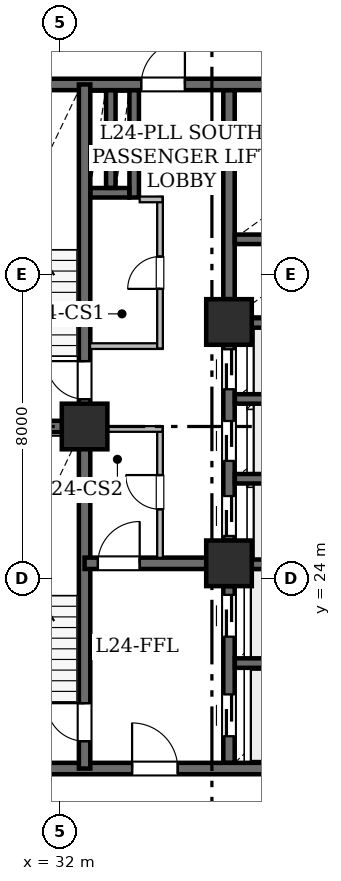
"""IFC4 building model, lengths in metres.
Left out: names, types, materials, properties, quantities, classifications, styles, units other than length and angle.
Written with IfcOpenShell. Run it as: python <this file> out.ifc"""

import sys

from ifc_helpers import new_model, si_unit, direction, frame, frame_2d, origin, origin_2d, place, context, subcontext, project, spatial, rectangle, hollow_rectangle, extrude, element, fill, save


model = new_model("IFC4")
c1 = context("Model", 3, precision=1e-05, world=origin(), true_north=direction((0.0, 1.0)))
c2 = subcontext(c1, "Body", "Model", "MODEL_VIEW")
j1 = project(units=[si_unit("LENGTHUNIT", "METRE"), si_unit("PLANEANGLEUNIT", "RADIAN")], contexts=[c1])
p1 = place(None, origin())
s1 = spatial("IfcSite", under=j1, at=p1, CompositionType="ELEMENT")
p2 = place(p1, origin())
s2 = spatial("IfcBuilding", under=s1, at=p2, CompositionType="ELEMENT")
p3 = place(p2, frame((0.0, 0.0, 98.25)))
s3 = spatial("IfcBuildingStorey", under=s2, at=p3, CompositionType="ELEMENT", Elevation=98.25)
for number, where, z_axis, x_axis in (
    (1, (32.65, 28.0, 0.0), (0.0, 0.0, 1.0), (1.0, 0.0, 0.0)),
    (2, (36.45, 24.4, 0.0), (0.0, 0.0, 1.0), (1.0, 0.0, 0.0)),
    (3, (36.45, 30.75, 0.0), (0.0, 0.0, 1.0), (1.0, 0.0, 0.0)),
):
    element("IfcColumn", number, at=place(p3, frame(where, z_axis=z_axis, x_axis=x_axis)), inside=s3, PredefinedType="COLUMN", context=c2, shape_type="SweptSolid", body=[
        extrude(hollow_rectangle(XDim=1.2, YDim=1.2, WallThickness=0.06, at=origin_2d()), origin(), (0.0, 0.0, 1.0), 3.65),
    ])
p4 = place(p3, frame((29.0, 19.0, 0.0), z_axis=(0.0, 0.0, 1.0), x_axis=(1.0, 0.0, 0.0)))
e4 = element("IfcWall", 4, at=p4, inside=s3, PredefinedType="SHEAR", context=c2, shape_type="SweptSolid", body=[
    extrude(rectangle(XDim=10.4, YDim=0.3, at=frame_2d((5.2, 0.0))), origin(), (0.0, 0.0, 1.0), 3.43),
])
p5 = place(p4, frame((4.9, 0.0, 0.0)))
e5 = element("IfcOpeningElement", 5, at=p5, cuts=e4, PredefinedType="OPENING", context=c2, shape_type="SweptSolid", body=[
    extrude(rectangle(XDim=1.2, YDim=2.15, at=frame_2d((0.6, 1.075))), frame((0.0, 0.16, 0.0), z_axis=(0.0, -1.0, 0.0), x_axis=(1.0, 0.0, 0.0)), (0.0, 0.0, 1.0), 0.32),
])
p6 = place(p3, frame((29.0, 37.0, 0.0), z_axis=(0.0, 0.0, 1.0), x_axis=(1.0, 0.0, 0.0)))
e6 = element("IfcWall", 6, at=p6, inside=s3, PredefinedType="SHEAR", context=c2, shape_type="SweptSolid", body=[
    extrude(rectangle(XDim=10.4, YDim=0.3, at=frame_2d((5.2, 0.0))), origin(), (0.0, 0.0, 1.0), 3.43),
])
p7 = place(p6, frame((5.14, 0.0, 0.0)))
e7 = element("IfcOpeningElement", 7, at=p7, cuts=e6, PredefinedType="OPENING", context=c2, shape_type="SweptSolid", body=[
    extrude(rectangle(XDim=1.15, YDim=2.2, at=frame_2d((0.575, 1.1))), frame((0.0, 0.16, 0.0), z_axis=(0.0, -1.0, 0.0), x_axis=(1.0, 0.0, 0.0)), (0.0, 0.0, 1.0), 0.32),
])
p8 = place(p3, frame((32.65, 19.0, 0.0), z_axis=(0.0, 0.0, 1.0), x_axis=(0.0, 1.0, 0.0)))
e8 = element("IfcWall", 8, at=p8, inside=s3, PredefinedType="SHEAR", context=c2, shape_type="SweptSolid", body=[
    extrude(rectangle(XDim=9.0, YDim=0.3, at=frame_2d((4.5, 0.0))), origin(), (0.0, 0.0, 1.0), 3.43),
])
p9 = place(p8, frame((0.72, 0.0, 0.0)))
e9 = element("IfcOpeningElement", 9, at=p9, cuts=e8, PredefinedType="OPENING", context=c2, shape_type="SweptSolid", body=[
    extrude(rectangle(XDim=1.0, YDim=2.15, at=frame_2d((0.5, 1.075))), frame((0.0, 0.16, 0.0), z_axis=(0.0, -1.0, 0.0), x_axis=(1.0, 0.0, 0.0)), (0.0, 0.0, 1.0), 0.32),
])
p10 = place(p3, frame((32.65, 28.0, 0.0), z_axis=(0.0, 0.0, 1.0), x_axis=(0.0, 1.0, 0.0)))
e10 = element("IfcWall", 10, at=p10, inside=s3, PredefinedType="SHEAR", context=c2, shape_type="SweptSolid", body=[
    extrude(rectangle(XDim=9.0, YDim=0.3, at=frame_2d((4.5, 0.0))), origin(), (0.0, 0.0, 1.0), 3.43),
])
p11 = place(p10, frame((0.72, 0.0, 0.0)))
e11 = element("IfcOpeningElement", 11, at=p11, cuts=e10, PredefinedType="OPENING", context=c2, shape_type="SweptSolid", body=[
    extrude(rectangle(XDim=1.0, YDim=2.15, at=frame_2d((0.5, 1.075))), frame((0.0, 0.16, 0.0), z_axis=(0.0, -1.0, 0.0), x_axis=(1.0, 0.0, 0.0)), (0.0, 0.0, 1.0), 0.32),
])
p12 = place(p3, frame((29.0, 28.0, 0.0), z_axis=(0.0, 0.0, 1.0), x_axis=(1.0, 0.0, 0.0)))
e12 = element("IfcWall", 12, at=p12, inside=s3, PredefinedType="SHEAR", context=c2, shape_type="SweptSolid", body=[
    extrude(rectangle(XDim=3.65, YDim=0.3, at=frame_2d((1.825, 0.0))), origin(), (0.0, 0.0, 1.0), 3.43),
])
p13 = place(p3, frame((32.65, 24.4, 0.0), z_axis=(0.0, 0.0, 1.0), x_axis=(1.0, 0.0, 0.0)))
e13 = element("IfcWall", 13, at=p13, inside=s3, PredefinedType="SHEAR", context=c2, shape_type="SweptSolid", body=[
    extrude(rectangle(XDim=3.8, YDim=0.3, at=frame_2d((1.9, 0.0))), origin(), (0.0, 0.0, 1.0), 3.43),
])
p14 = place(p13, frame((0.35, 0.0, 0.0)))
e14 = element("IfcOpeningElement", 14, at=p14, cuts=e13, PredefinedType="OPENING", context=c2, shape_type="SweptSolid", body=[
    extrude(rectangle(XDim=1.1, YDim=2.15, at=frame_2d((0.55, 1.075))), frame((0.0, 0.16, 0.0), z_axis=(0.0, -1.0, 0.0), x_axis=(1.0, 0.0, 0.0)), (0.0, 0.0, 1.0), 0.32),
])
p15 = place(p3, frame((36.45, 19.154, 0.0), z_axis=(0.0, 0.0, 1.0), x_axis=(0.0, 1.0, 0.0)))
e15 = element("IfcWall", 15, at=p15, inside=s3, PredefinedType="SHEAR", context=c2, shape_type="SweptSolid", body=[
    extrude(rectangle(XDim=4.646, YDim=0.3, at=frame_2d((2.323, 0.0))), origin(), (0.0, 0.0, 1.0), 3.43),
])
p16 = place(p15, frame((0.696, 0.0, 0.0)))
e16 = element("IfcOpeningElement", 16, at=p16, cuts=e15, PredefinedType="OPENING", context=c2, shape_type="SweptSolid", body=[
    extrude(rectangle(XDim=1.1, YDim=2.15, at=frame_2d((0.55, 1.075))), frame((0.0, 0.16, 0.0), z_axis=(0.0, -1.0, 0.0), x_axis=(1.0, 0.0, 0.0)), (0.0, 0.0, 1.0), 0.32),
])
p17 = place(p15, frame((3.316, 0.0, 0.0)))
e17 = element("IfcOpeningElement", 17, at=p17, cuts=e15, PredefinedType="OPENING", context=c2, shape_type="SweptSolid", body=[
    extrude(rectangle(XDim=1.1, YDim=2.15, at=frame_2d((0.55, 1.075))), frame((0.0, 0.16, 0.0), z_axis=(0.0, -1.0, 0.0), x_axis=(1.0, 0.0, 0.0)), (0.0, 0.0, 1.0), 0.32),
])
p18 = place(p3, frame((36.45, 25.0, 0.0), z_axis=(0.0, 0.0, 1.0), x_axis=(0.0, 1.0, 0.0)))
e18 = element("IfcWall", 18, at=p18, inside=s3, PredefinedType="SHEAR", context=c2, shape_type="SweptSolid", body=[
    extrude(rectangle(XDim=5.15, YDim=0.3, at=frame_2d((2.575, 0.0))), origin(), (0.0, 0.0, 1.0), 3.43),
])
p19 = place(p18, frame((0.12, 0.0, 0.0)))
e19 = element("IfcOpeningElement", 19, at=p19, cuts=e18, PredefinedType="OPENING", context=c2, shape_type="SweptSolid", body=[
    extrude(rectangle(XDim=1.05, YDim=2.15, at=frame_2d((0.525, 1.075))), frame((0.0, 0.16, 0.0), z_axis=(0.0, -1.0, 0.0), x_axis=(1.0, 0.0, 0.0)), (0.0, 0.0, 1.0), 0.32),
])
p20 = place(p18, frame((2.095, 0.0, 0.0)))
e20 = element("IfcOpeningElement", 20, at=p20, cuts=e18, PredefinedType="OPENING", context=c2, shape_type="SweptSolid", body=[
    extrude(rectangle(XDim=1.05, YDim=2.15, at=frame_2d((0.525, 1.075))), frame((0.0, 0.16, 0.0), z_axis=(0.0, -1.0, 0.0), x_axis=(1.0, 0.0, 0.0)), (0.0, 0.0, 1.0), 0.32),
])
p21 = place(p18, frame((3.98, 0.0, 0.0)))
e21 = element("IfcOpeningElement", 21, at=p21, cuts=e18, PredefinedType="OPENING", context=c2, shape_type="SweptSolid", body=[
    extrude(rectangle(XDim=1.05, YDim=2.15, at=frame_2d((0.525, 1.075))), frame((0.0, 0.16, 0.0), z_axis=(0.0, -1.0, 0.0), x_axis=(1.0, 0.0, 0.0)), (0.0, 0.0, 1.0), 0.32),
])
p22 = place(p3, frame((36.45, 31.35, 0.0), z_axis=(0.0, 0.0, 1.0), x_axis=(0.0, 1.0, 0.0)))
e22 = element("IfcWall", 22, at=p22, inside=s3, PredefinedType="SHEAR", context=c2, shape_type="SweptSolid", body=[
    extrude(rectangle(XDim=5.496, YDim=0.3, at=frame_2d((2.748, 0.0))), origin(), (0.0, 0.0, 1.0), 3.43),
])
for number, where, z_axis, x_axis in (
    (23, (36.604, 21.775, 0.0), (0.0, 0.0, 1.0), (1.0, 0.0, 0.0)),
    (24, (36.604, 24.375, 0.0), (0.0, 0.0, 1.0), (1.0, 0.0, 0.0)),
    (25, (36.604, 26.625, 0.0), (0.0, 0.0, 1.0), (1.0, 0.0, 0.0)),
    (26, (36.604, 28.725, 0.0), (0.0, 0.0, 1.0), (1.0, 0.0, 0.0)),
    (27, (36.604, 30.725, 0.0), (0.0, 0.0, 1.0), (1.0, 0.0, 0.0)),
    (28, (36.604, 32.925, 0.0), (0.0, 0.0, 1.0), (1.0, 0.0, 0.0)),
    (29, (36.604, 34.975, 0.0), (0.0, 0.0, 1.0), (1.0, 0.0, 0.0)),
):
    element("IfcWall", number, at=place(p3, frame(where, z_axis=z_axis, x_axis=x_axis)), inside=s3, PredefinedType="SHEAR", context=c2, shape_type="SweptSolid", body=[
        extrude(rectangle(XDim=2.642, YDim=0.25, at=frame_2d((1.321, 0.0))), origin(), (0.0, 0.0, 1.0), 3.43),
    ])
p23 = place(p3, frame((33.955, 34.025, 0.0), z_axis=(0.0, 0.0, 1.0), x_axis=(0.0, 1.0, 0.0)))
e30 = element("IfcWall", 30, at=p23, inside=s3, PredefinedType="SHEAR", context=c2, shape_type="SweptSolid", body=[
    extrude(rectangle(XDim=2.821, YDim=0.25, at=frame_2d((1.411, 0.0))), origin(), (0.0, 0.0, 1.0), 3.43),
])
p24 = place(p3, frame((32.804, 34.15, 0.0), z_axis=(0.0, 0.0, 1.0), x_axis=(1.0, 0.0, 0.0)))
e31 = element("IfcWall", 31, at=p24, inside=s3, PredefinedType="SHEAR", context=c2, shape_type="SweptSolid", body=[
    extrude(rectangle(XDim=1.022, YDim=0.25, at=frame_2d((0.511, 0.0))), origin(), (0.0, 0.0, 1.0), 3.43),
])
p25 = place(p3, frame((33.34, 34.279, 0.0), z_axis=(0.0, 0.0, 1.0), x_axis=(0.0, 1.0, 0.0)))
e32 = element("IfcWall", 32, at=p25, inside=s3, PredefinedType="SHEAR", context=c2, shape_type="SweptSolid", body=[
    extrude(rectangle(XDim=2.567, YDim=0.25, at=frame_2d((1.283, 0.0))), origin(), (0.0, 0.0, 1.0), 3.43),
])
p26 = place(p3, frame((32.794, 30.115, 0.0), z_axis=(0.0, 0.0, 1.0), x_axis=(1.0, 0.0, 0.0)))
e33 = element("IfcWall", 33, at=p26, inside=s3, PredefinedType="STANDARD", context=c2, shape_type="SweptSolid", body=[
    extrude(rectangle(XDim=1.906, YDim=0.15, at=frame_2d((0.953, 0.0))), origin(), (0.0, 0.0, 1.0), 2.887),
])
p27 = place(p3, frame((34.635, 30.052, 0.0), z_axis=(0.0, 0.0, 1.0), x_axis=(0.0, 1.0, 0.0)))
e34 = element("IfcWall", 34, at=p27, inside=s3, PredefinedType="STANDARD", context=c2, shape_type="SweptSolid", body=[
    extrude(rectangle(XDim=3.988, YDim=0.15, at=frame_2d((1.994, 0.0))), origin(), (0.0, 0.0, 1.0), 3.43),
])
p28 = place(p27, frame((1.569, 0.0, 0.0)))
e35 = element("IfcOpeningElement", 35, at=p28, cuts=e34, PredefinedType="OPENING", context=c2, shape_type="SweptSolid", body=[
    extrude(rectangle(XDim=0.85, YDim=2.1, at=frame_2d((0.425, 1.05))), frame((0.0, 0.085, 0.0), z_axis=(0.0, -1.0, 0.0), x_axis=(1.0, 0.0, 0.0)), (0.0, 0.0, 1.0), 0.17),
])
p29 = place(p3, frame((34.7, 33.975, 0.0), z_axis=(0.0, 0.0, 1.0), x_axis=(-1.0, 0.0, 0.0)))
e36 = element("IfcWall", 36, at=p29, inside=s3, PredefinedType="STANDARD", context=c2, shape_type="SweptSolid", body=[
    extrude(rectangle(XDim=0.6, YDim=0.15, at=frame_2d((0.3, 0.0))), origin(), (0.0, 0.0, 1.0), 3.43),
])
p30 = place(p3, frame((34.635, 24.544, 0.0), z_axis=(0.0, 0.0, 1.0), x_axis=(0.0, 1.0, 0.0)))
e37 = element("IfcWall", 37, at=p30, inside=s3, PredefinedType="STANDARD", context=c2, shape_type="SweptSolid", body=[
    extrude(rectangle(XDim=3.456, YDim=0.15, at=frame_2d((1.728, 0.0))), origin(), (0.0, 0.0, 1.0), 3.43),
])
p31 = place(p30, frame((1.278, 0.0, 0.0)))
e38 = element("IfcOpeningElement", 38, at=p31, cuts=e37, PredefinedType="OPENING", context=c2, shape_type="SweptSolid", body=[
    extrude(rectangle(XDim=0.9, YDim=2.1, at=frame_2d((0.45, 1.05))), frame((0.0, 0.085, 0.0), z_axis=(0.0, -1.0, 0.0), x_axis=(1.0, 0.0, 0.0)), (0.0, 0.0, 1.0), 0.17),
])
p32 = place(p3, frame((34.7, 27.935, 0.0), z_axis=(0.0, 0.0, 1.0), x_axis=(-1.0, 0.0, 0.0)))
e39 = element("IfcWall", 39, at=p32, inside=s3, PredefinedType="STANDARD", context=c2, shape_type="SweptSolid", body=[
    extrude(rectangle(XDim=1.906, YDim=0.15, at=frame_2d((0.953, 0.0))), origin(), (0.0, 0.0, 1.0), 2.887),
])
p33 = place(p9, origin())
e40 = element("IfcDoor", 40, at=p33, inside=s3, OperationType="SINGLE_SWING_RIGHT", PredefinedType="DOOR", context=c2, shape_type="SweptSolid", body=[
    extrude(rectangle(XDim=1.0, YDim=2.15, at=frame_2d((0.5, 1.075))), frame((0.0, 0.025, 0.0), z_axis=(0.0, -1.0, 0.0), x_axis=(1.0, 0.0, 0.0)), (0.0, 0.0, 1.0), 0.05),
])
fill(e9, e40)
p34 = place(p11, origin())
e41 = element("IfcDoor", 41, at=p34, inside=s3, OperationType="SINGLE_SWING_RIGHT", PredefinedType="DOOR", context=c2, shape_type="SweptSolid", body=[
    extrude(rectangle(XDim=1.0, YDim=2.15, at=frame_2d((0.5, 1.075))), frame((0.0, 0.025, 0.0), z_axis=(0.0, -1.0, 0.0), x_axis=(1.0, 0.0, 0.0)), (0.0, 0.0, 1.0), 0.05),
])
fill(e11, e41)
p35 = place(p14, origin())
e42 = element("IfcDoor", 42, at=p35, inside=s3, OperationType="SINGLE_SWING_RIGHT", PredefinedType="DOOR", context=c2, shape_type="SweptSolid", body=[
    extrude(rectangle(XDim=1.1, YDim=2.15, at=frame_2d((0.55, 1.075))), frame((0.0, 0.025, 0.0), z_axis=(0.0, -1.0, 0.0), x_axis=(1.0, 0.0, 0.0)), (0.0, 0.0, 1.0), 0.05),
])
fill(e14, e42)
p36 = place(p5, origin())
e43 = element("IfcDoor", 43, at=p36, inside=s3, OperationType="SINGLE_SWING_LEFT", PredefinedType="DOOR", context=c2, shape_type="SweptSolid", body=[
    extrude(rectangle(XDim=1.2, YDim=2.15, at=frame_2d((0.6, 1.075))), frame((0.0, 0.025, 0.0), z_axis=(0.0, -1.0, 0.0), x_axis=(1.0, 0.0, 0.0)), (0.0, 0.0, 1.0), 0.05),
])
fill(e5, e43)
p37 = place(p7, origin())
e44 = element("IfcDoor", 44, at=p37, inside=s3, OperationType="SINGLE_SWING_RIGHT", PredefinedType="DOOR", context=c2, shape_type="SweptSolid", body=[
    extrude(rectangle(XDim=1.15, YDim=2.2, at=frame_2d((0.575, 1.1))), frame((0.0, 0.025, 0.0), z_axis=(0.0, -1.0, 0.0), x_axis=(1.0, 0.0, 0.0)), (0.0, 0.0, 1.0), 0.05),
])
fill(e7, e44)
p38 = place(p16, origin())
e45 = element("IfcDoor", 45, at=p38, inside=s3, OperationType="SLIDING_TO_LEFT", PredefinedType="DOOR", context=c2, shape_type="SweptSolid", body=[
    extrude(rectangle(XDim=1.1, YDim=2.15, at=frame_2d((0.55, 1.075))), frame((0.0, 0.025, 0.0), z_axis=(0.0, -1.0, 0.0), x_axis=(1.0, 0.0, 0.0)), (0.0, 0.0, 1.0), 0.05),
])
fill(e16, e45)
p39 = place(p17, origin())
e46 = element("IfcDoor", 46, at=p39, inside=s3, OperationType="SLIDING_TO_LEFT", PredefinedType="DOOR", context=c2, shape_type="SweptSolid", body=[
    extrude(rectangle(XDim=1.1, YDim=2.15, at=frame_2d((0.55, 1.075))), frame((0.0, 0.025, 0.0), z_axis=(0.0, -1.0, 0.0), x_axis=(1.0, 0.0, 0.0)), (0.0, 0.0, 1.0), 0.05),
])
fill(e17, e46)
p40 = place(p19, origin())
e47 = element("IfcDoor", 47, at=p40, inside=s3, OperationType="SLIDING_TO_LEFT", PredefinedType="DOOR", context=c2, shape_type="SweptSolid", body=[
    extrude(rectangle(XDim=1.05, YDim=2.15, at=frame_2d((0.525, 1.075))), frame((0.0, 0.025, 0.0), z_axis=(0.0, -1.0, 0.0), x_axis=(1.0, 0.0, 0.0)), (0.0, 0.0, 1.0), 0.05),
])
fill(e19, e47)
p41 = place(p20, origin())
e48 = element("IfcDoor", 48, at=p41, inside=s3, OperationType="SLIDING_TO_LEFT", PredefinedType="DOOR", context=c2, shape_type="SweptSolid", body=[
    extrude(rectangle(XDim=1.05, YDim=2.15, at=frame_2d((0.525, 1.075))), frame((0.0, 0.025, 0.0), z_axis=(0.0, -1.0, 0.0), x_axis=(1.0, 0.0, 0.0)), (0.0, 0.0, 1.0), 0.05),
])
fill(e20, e48)
p42 = place(p21, origin())
e49 = element("IfcDoor", 49, at=p42, inside=s3, OperationType="SLIDING_TO_LEFT", PredefinedType="DOOR", context=c2, shape_type="SweptSolid", body=[
    extrude(rectangle(XDim=1.05, YDim=2.15, at=frame_2d((0.525, 1.075))), frame((0.0, 0.025, 0.0), z_axis=(0.0, -1.0, 0.0), x_axis=(1.0, 0.0, 0.0)), (0.0, 0.0, 1.0), 0.05),
])
fill(e21, e49)
p43 = place(p28, origin())
e50 = element("IfcDoor", 50, at=p43, inside=s3, OperationType="SINGLE_SWING_LEFT", PredefinedType="DOOR", context=c2, shape_type="SweptSolid", body=[
    extrude(rectangle(XDim=0.85, YDim=2.1, at=frame_2d((0.425, 1.05))), frame((0.0, 0.025, 0.0), z_axis=(0.0, -1.0, 0.0), x_axis=(1.0, 0.0, 0.0)), (0.0, 0.0, 1.0), 0.05),
])
fill(e35, e50)
p44 = place(p31, origin())
e51 = element("IfcDoor", 51, at=p44, inside=s3, OperationType="SINGLE_SWING_RIGHT", PredefinedType="DOOR", context=c2, shape_type="SweptSolid", body=[
    extrude(rectangle(XDim=0.9, YDim=2.1, at=frame_2d((0.45, 1.05))), frame((0.0, 0.025, 0.0), z_axis=(0.0, -1.0, 0.0), x_axis=(1.0, 0.0, 0.0)), (0.0, 0.0, 1.0), 0.05),
])
fill(e38, e51)
save(model, sys.argv[1])
